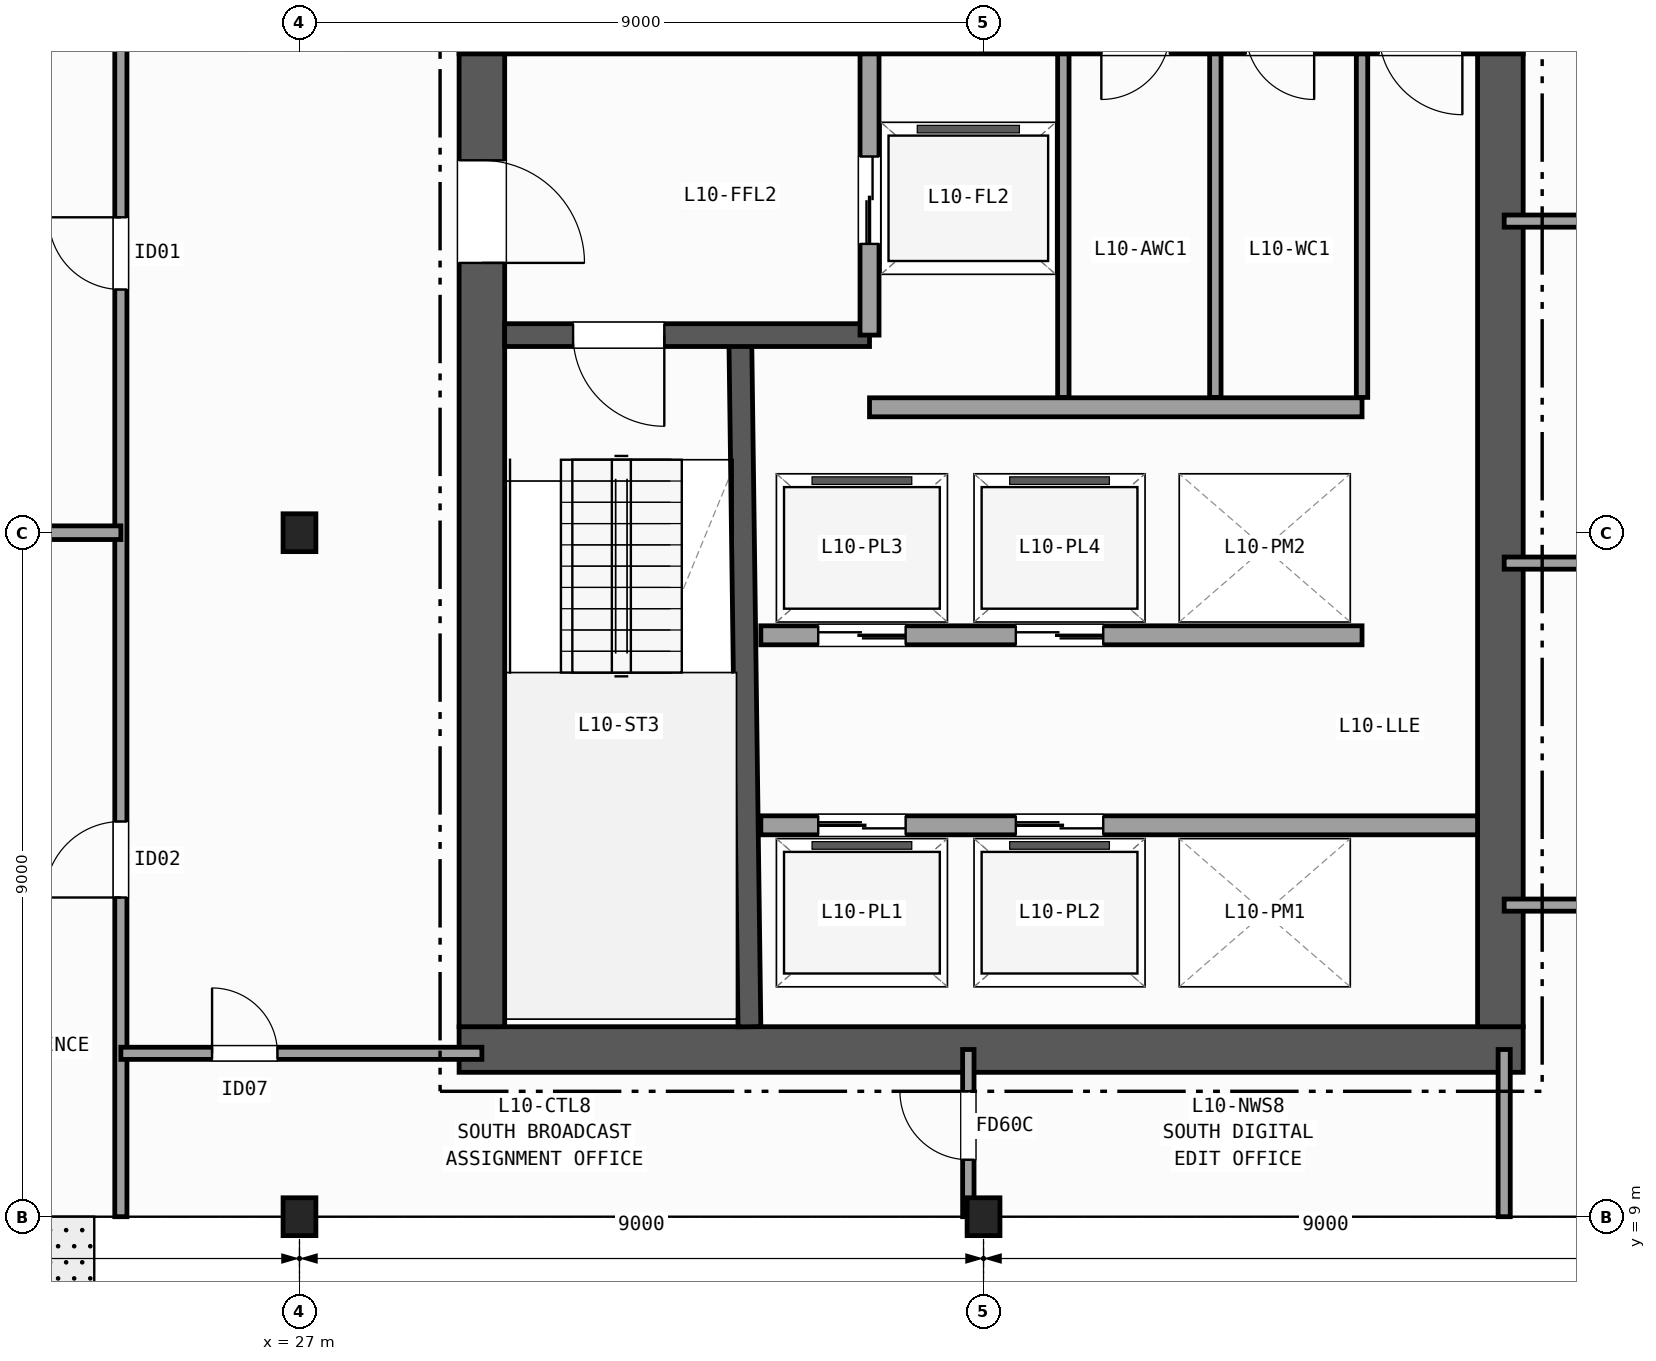
"""IFC4 building model, lengths in metres.
Left out: names, types, materials, properties, quantities, classifications, styles, units other than length and angle.
Written with IfcOpenShell. Run it as: python <this file> out.ifc"""

import sys

from ifc_helpers import new_model, si_unit, direction, frame, frame_2d, origin, origin_2d, place, context, subcontext, project, spatial, rectangle, i_section, extrude, element, fill, save


model = new_model("IFC4")
c1 = context("Model", 3, precision=1e-05, world=origin(), true_north=direction((0.0, 1.0)))
c2 = subcontext(c1, "Body", "Model", "MODEL_VIEW")
j1 = project(units=[si_unit("LENGTHUNIT", "METRE"), si_unit("PLANEANGLEUNIT", "RADIAN")], contexts=[c1])
p1 = place(None, origin())
s1 = spatial("IfcSite", under=j1, at=p1, CompositionType="ELEMENT")
p2 = place(p1, origin())
s2 = spatial("IfcBuilding", under=s1, at=p2, CompositionType="ELEMENT")
p3 = place(p2, frame((0.0, 0.0, 47.1)))
s3 = spatial("IfcBuildingStorey", under=s2, at=p3, CompositionType="ELEMENT", Elevation=47.1)
for number, where, z_axis, x_axis in (
    (1, (27.0, 9.0, 0.0), (0.0, 0.0, 1.0), (1.0, 0.0, 0.0)),
    (2, (27.0, 18.0, 0.0), (0.0, 0.0, 1.0), (1.0, 0.0, 0.0)),
    (3, (36.0, 9.0, 0.0), (0.0, 0.0, 1.0), (1.0, 0.0, 0.0)),
):
    element("IfcColumn", number, at=place(p3, frame(where, z_axis=z_axis, x_axis=x_axis)), inside=s3, PredefinedType="COLUMN", context=c2, shape_type="SweptSolid", body=[
        extrude(i_section(OverallWidth=0.432, OverallDepth=0.498, WebThickness=0.056, FlangeThickness=0.089, FilletRadius=0.015, at=origin_2d()), origin(), (0.0, 0.0, 1.0), 3.7),
    ])
p4 = place(p3, frame((29.1, 11.2, 0.0), z_axis=(0.0, 0.0, 1.0), x_axis=(1.0, 0.0, 0.0)))
e4 = element("IfcWall", 4, at=p4, inside=s3, PredefinedType="SHEAR", context=c2, shape_type="SweptSolid", body=[
    extrude(rectangle(XDim=14.0, YDim=0.6, at=frame_2d((7.0, 0.0))), origin(), (0.0, 0.0, 1.0), 3.42),
])
p5 = place(p3, frame((43.1, 24.6, 0.0), z_axis=(0.0, 0.0, 1.0), x_axis=(-1.0, 0.0, 0.0)))
e5 = element("IfcWall", 5, at=p5, inside=s3, PredefinedType="SHEAR", context=c2, shape_type="SweptSolid", body=[
    extrude(rectangle(XDim=14.0, YDim=0.6, at=frame_2d((7.0, 0.0))), origin(), (0.0, 0.0, 1.0), 3.42),
])
p6 = place(p5, frame((0.8, 0.0, 0.0)))
e6 = element("IfcOpeningElement", 6, at=p6, cuts=e5, PredefinedType="OPENING", context=c2, shape_type="SweptSolid", body=[
    extrude(rectangle(XDim=1.1, YDim=2.15, at=frame_2d((0.55, 1.075))), frame((0.0, 0.31, 0.0), z_axis=(0.0, -1.0, 0.0), x_axis=(1.0, 0.0, 0.0)), (0.0, 0.0, 1.0), 0.62),
])
p7 = place(p5, frame((2.75, 0.0, 0.0)))
e7 = element("IfcOpeningElement", 7, at=p7, cuts=e5, PredefinedType="OPENING", context=c2, shape_type="SweptSolid", body=[
    extrude(rectangle(XDim=0.9, YDim=2.1, at=frame_2d((0.45, 1.05))), frame((0.0, 0.31, 0.0), z_axis=(0.0, -1.0, 0.0), x_axis=(1.0, 0.0, 0.0)), (0.0, 0.0, 1.0), 0.62),
])
p8 = place(p5, frame((4.65, 0.0, 0.0)))
e8 = element("IfcOpeningElement", 8, at=p8, cuts=e5, PredefinedType="OPENING", context=c2, shape_type="SweptSolid", body=[
    extrude(rectangle(XDim=0.9, YDim=2.1, at=frame_2d((0.45, 1.05))), frame((0.0, 0.31, 0.0), z_axis=(0.0, -1.0, 0.0), x_axis=(1.0, 0.0, 0.0)), (0.0, 0.0, 1.0), 0.62),
])
p9 = place(p3, frame((29.4, 24.3, 0.0), z_axis=(0.0, 0.0, 1.0), x_axis=(0.0, -1.0, 0.0)))
e9 = element("IfcWall", 9, at=p9, inside=s3, PredefinedType="SHEAR", context=c2, shape_type="SweptSolid", body=[
    extrude(rectangle(XDim=12.8, YDim=0.6, at=frame_2d((6.4, 0.0))), origin(), (0.0, 0.0, 1.0), 3.42),
])
p10 = place(p9, frame((1.4, 0.0, 0.0)))
e10 = element("IfcOpeningElement", 10, at=p10, cuts=e9, PredefinedType="OPENING", context=c2, shape_type="SweptSolid", body=[
    extrude(rectangle(XDim=1.35, YDim=2.15, at=frame_2d((0.675, 1.075))), frame((0.0, 0.31, 0.0), z_axis=(0.0, -1.0, 0.0), x_axis=(1.0, 0.0, 0.0)), (0.0, 0.0, 1.0), 0.62),
])
p11 = place(p3, frame((42.8, 11.5, 0.0), z_axis=(0.0, 0.0, 1.0), x_axis=(0.0, 1.0, 0.0)))
e11 = element("IfcWall", 11, at=p11, inside=s3, PredefinedType="SHEAR", context=c2, shape_type="SweptSolid", body=[
    extrude(rectangle(XDim=12.8, YDim=0.6, at=frame_2d((6.4, 0.0))), origin(), (0.0, 0.0, 1.0), 3.42),
])
p12 = place(p3, frame((32.92, 11.5, 0.0), z_axis=(0.0, 0.0, 1.0), x_axis=(-0.013244407292, 0.999912288991, 0.0)))
e12 = element("IfcWall", 12, at=p12, inside=s3, PredefinedType="SHEAR", context=c2, shape_type="SweptSolid", body=[
    extrude(rectangle(XDim=9.051, YDim=0.3, at=frame_2d((4.525, 0.0))), origin(), (0.0, 0.0, 1.0), 3.42),
])
p13 = place(p3, frame((34.5, 20.6, 0.0), z_axis=(0.0, 0.0, 1.0), x_axis=(-1.0, 0.0, 0.0)))
e13 = element("IfcWall", 13, at=p13, inside=s3, PredefinedType="SHEAR", context=c2, shape_type="SweptSolid", body=[
    extrude(rectangle(XDim=4.8, YDim=0.3, at=frame_2d((2.4, 0.0))), origin(), (0.0, 0.0, 1.0), 3.42),
])
p14 = place(p13, frame((2.7, 0.0, 0.0)))
e14 = element("IfcOpeningElement", 14, at=p14, cuts=e13, PredefinedType="OPENING", context=c2, shape_type="SweptSolid", body=[
    extrude(rectangle(XDim=1.2, YDim=2.15, at=frame_2d((0.6, 1.075))), frame((0.0, 0.16, 0.0), z_axis=(0.0, -1.0, 0.0), x_axis=(1.0, 0.0, 0.0)), (0.0, 0.0, 1.0), 0.32),
])
p15 = place(p3, frame((34.5, 20.6, 0.0), z_axis=(0.0, 0.0, 1.0), x_axis=(0.0, 1.0, 0.0)))
e15 = element("IfcWall", 15, at=p15, inside=s3, PredefinedType="PARTITIONING", context=c2, shape_type="SweptSolid", body=[
    extrude(rectangle(XDim=3.7, YDim=0.25, at=frame_2d((1.85, 0.0))), origin(), (0.0, 0.0, 1.0), 3.42),
])
p16 = place(p15, frame((1.2, 0.0, 0.0)))
e16 = element("IfcOpeningElement", 16, at=p16, cuts=e15, PredefinedType="OPENING", context=c2, shape_type="SweptSolid", body=[
    extrude(rectangle(XDim=1.15, YDim=2.15, at=frame_2d((0.575, 1.075))), frame((0.0, 0.135, 0.0), z_axis=(0.0, -1.0, 0.0), x_axis=(1.0, 0.0, 0.0)), (0.0, 0.0, 1.0), 0.27),
])
p17 = place(p3, frame((34.5, 19.65, 0.0), z_axis=(0.0, 0.0, 1.0), x_axis=(1.0, 0.0, 0.0)))
e17 = element("IfcWall", 17, at=p17, inside=s3, PredefinedType="PARTITIONING", context=c2, shape_type="SweptSolid", body=[
    extrude(rectangle(XDim=6.48, YDim=0.25, at=frame_2d((3.24, 0.0))), origin(), (0.0, 0.0, 1.0), 3.42),
])
p18 = place(p3, frame((33.07, 14.15, 0.0), z_axis=(0.0, 0.0, 1.0), x_axis=(1.0, 0.0, 0.0)))
e18 = element("IfcWall", 18, at=p18, inside=s3, PredefinedType="PARTITIONING", context=c2, shape_type="SweptSolid", body=[
    extrude(rectangle(XDim=9.43, YDim=0.25, at=frame_2d((4.715, 0.0))), origin(), (0.0, 0.0, 1.0), 3.42),
])
p19 = place(p18, frame((0.755, 0.0, 0.0)))
e19 = element("IfcOpeningElement", 19, at=p19, cuts=e18, PredefinedType="OPENING", context=c2, shape_type="SweptSolid", body=[
    extrude(rectangle(XDim=1.15, YDim=2.15, at=frame_2d((0.575, 1.075))), frame((0.0, 0.135, 0.0), z_axis=(0.0, -1.0, 0.0), x_axis=(1.0, 0.0, 0.0)), (0.0, 0.0, 1.0), 0.27),
])
p20 = place(p18, frame((3.355, 0.0, 0.0)))
e20 = element("IfcOpeningElement", 20, at=p20, cuts=e18, PredefinedType="OPENING", context=c2, shape_type="SweptSolid", body=[
    extrude(rectangle(XDim=1.15, YDim=2.15, at=frame_2d((0.575, 1.075))), frame((0.0, 0.135, 0.0), z_axis=(0.0, -1.0, 0.0), x_axis=(1.0, 0.0, 0.0)), (0.0, 0.0, 1.0), 0.27),
])
p21 = place(p3, frame((40.98, 16.65, 0.0), z_axis=(0.0, 0.0, 1.0), x_axis=(-1.0, 0.0, 0.0)))
e21 = element("IfcWall", 21, at=p21, inside=s3, PredefinedType="PARTITIONING", context=c2, shape_type="SweptSolid", body=[
    extrude(rectangle(XDim=7.91, YDim=0.25, at=frame_2d((3.955, 0.0))), origin(), (0.0, 0.0, 1.0), 3.42),
])
p22 = place(p21, frame((6.005, 0.0, 0.0)))
e22 = element("IfcOpeningElement", 22, at=p22, cuts=e21, PredefinedType="OPENING", context=c2, shape_type="SweptSolid", body=[
    extrude(rectangle(XDim=1.15, YDim=2.15, at=frame_2d((0.575, 1.075))), frame((0.0, 0.135, 0.0), z_axis=(0.0, -1.0, 0.0), x_axis=(1.0, 0.0, 0.0)), (0.0, 0.0, 1.0), 0.27),
])
p23 = place(p21, frame((3.405, 0.0, 0.0)))
e23 = element("IfcOpeningElement", 23, at=p23, cuts=e21, PredefinedType="OPENING", context=c2, shape_type="SweptSolid", body=[
    extrude(rectangle(XDim=1.15, YDim=2.15, at=frame_2d((0.575, 1.075))), frame((0.0, 0.135, 0.0), z_axis=(0.0, -1.0, 0.0), x_axis=(1.0, 0.0, 0.0)), (0.0, 0.0, 1.0), 0.27),
])
for number, where, z_axis, x_axis in (
    (24, (37.05, 19.78, 0.0), (0.0, 0.0, 1.0), (0.0, 1.0, 0.0)),
    (25, (39.05, 19.78, 0.0), (0.0, 0.0, 1.0), (0.0, 1.0, 0.0)),
    (26, (40.98, 19.78, 0.0), (0.0, 0.0, 1.0), (0.0, 1.0, 0.0)),
):
    element("IfcWall", number, at=place(p3, frame(where, z_axis=z_axis, x_axis=x_axis)), inside=s3, PredefinedType="PARTITIONING", context=c2, shape_type="SweptSolid", body=[
        extrude(rectangle(XDim=4.52, YDim=0.15, at=frame_2d((2.26, 0.0))), origin(), (0.0, 0.0, 1.0), 3.42),
    ])
p24 = place(p3, frame((24.65, 9.0, 0.0), z_axis=(0.0, 0.0, 1.0), x_axis=(0.0, 1.0, 0.0)))
e27 = element("IfcWall", 27, at=p24, inside=s3, PredefinedType="PARTITIONING", context=c2, shape_type="SweptSolid", body=[
    extrude(rectangle(XDim=19.2, YDim=0.16, at=frame_2d((9.6, 0.0))), origin(), (0.0, 0.0, 1.0), 2.627),
])
p25 = place(p24, frame((12.2, 0.0, 0.0)))
e28 = element("IfcOpeningElement", 28, at=p25, cuts=e27, PredefinedType="OPENING", context=c2, shape_type="SweptSolid", body=[
    extrude(rectangle(XDim=0.95, YDim=2.1, at=frame_2d((0.475, 1.05))), frame((0.0, 0.09, 0.0), z_axis=(0.0, -1.0, 0.0), x_axis=(1.0, 0.0, 0.0)), (0.0, 0.0, 1.0), 0.18),
])
p26 = place(p24, frame((4.2, 0.0, 0.0)))
e29 = element("IfcOpeningElement", 29, at=p26, cuts=e27, PredefinedType="OPENING", context=c2, shape_type="SweptSolid", body=[
    extrude(rectangle(XDim=1.0, YDim=2.1, at=frame_2d((0.5, 1.05))), frame((0.0, 0.09, 0.0), z_axis=(0.0, -1.0, 0.0), x_axis=(1.0, 0.0, 0.0)), (0.0, 0.0, 1.0), 0.18),
])
p27 = place(p3, frame((9.0, 18.0, 0.0), z_axis=(0.0, 0.0, 1.0), x_axis=(1.0, 0.0, 0.0)))
e30 = element("IfcWall", 30, at=p27, inside=s3, PredefinedType="PARTITIONING", context=c2, shape_type="SweptSolid", body=[
    extrude(rectangle(XDim=15.65, YDim=0.18, at=frame_2d((7.825, 0.0))), origin(), (0.0, 0.0, 1.0), 2.627),
])
p28 = place(p3, frame((24.65, 11.15, 0.0), z_axis=(0.0, 0.0, 1.0), x_axis=(1.0, 0.0, 0.0)))
e31 = element("IfcWall", 31, at=p28, inside=s3, PredefinedType="PARTITIONING", context=c2, shape_type="SweptSolid", body=[
    extrude(rectangle(XDim=4.75, YDim=0.16, at=frame_2d((2.375, 0.0))), origin(), (0.0, 0.0, 1.0), 2.792),
])
p29 = place(p28, frame((1.2, 0.0, 0.0)))
e32 = element("IfcOpeningElement", 32, at=p29, cuts=e31, PredefinedType="OPENING", context=c2, shape_type="SweptSolid", body=[
    extrude(rectangle(XDim=0.86, YDim=2.05, at=frame_2d((0.43, 1.025))), frame((0.0, 0.09, 0.0), z_axis=(0.0, -1.0, 0.0), x_axis=(1.0, 0.0, 0.0)), (0.0, 0.0, 1.0), 0.18),
])
p30 = place(p3, frame((35.8, 9.0, 0.0), z_axis=(0.0, 0.0, 1.0), x_axis=(0.0, 1.0, 0.0)))
e33 = element("IfcWall", 33, at=p30, inside=s3, PredefinedType="PARTITIONING", context=c2, shape_type="SweptSolid", body=[
    extrude(rectangle(XDim=2.2, YDim=0.15, at=frame_2d((1.1, 0.0))), origin(), (0.0, 0.0, 1.0), 2.627),
])
p31 = place(p30, frame((0.75, 0.0, 0.0)))
e34 = element("IfcOpeningElement", 34, at=p31, cuts=e33, PredefinedType="OPENING", context=c2, shape_type="SweptSolid", body=[
    extrude(rectangle(XDim=0.9, YDim=2.1, at=frame_2d((0.45, 1.05))), frame((0.0, 0.085, 0.0), z_axis=(0.0, -1.0, 0.0), x_axis=(1.0, 0.0, 0.0)), (0.0, 0.0, 1.0), 0.17),
])
p32 = place(p3, frame((42.85, 9.0, 0.0), z_axis=(0.0, 0.0, 1.0), x_axis=(0.0, 1.0, 0.0)))
e35 = element("IfcWall", 35, at=p32, inside=s3, PredefinedType="PARTITIONING", context=c2, shape_type="SweptSolid", body=[
    extrude(rectangle(XDim=2.2, YDim=0.16, at=frame_2d((1.1, 0.0))), origin(), (0.0, 0.0, 1.0), 2.627),
])
p33 = place(p3, frame((42.85, 13.1, 0.0), z_axis=(0.0, 0.0, 1.0), x_axis=(1.0, 0.0, 0.0)))
e36 = element("IfcWall", 36, at=p33, inside=s3, PredefinedType="PARTITIONING", context=c2, shape_type="SweptSolid", body=[
    extrude(rectangle(XDim=20.346, YDim=0.16, at=frame_2d((10.173, 0.0))), origin(), (0.0, 0.0, 1.0), 3.42),
])
p34 = place(p33, frame((4.6, 0.0, 0.0)))
e37 = element("IfcOpeningElement", 37, at=p34, cuts=e36, PredefinedType="OPENING", context=c2, shape_type="SweptSolid", body=[
    extrude(rectangle(XDim=1.05, YDim=2.15, at=frame_2d((0.525, 1.075))), frame((0.0, 0.09, 0.0), z_axis=(0.0, -1.0, 0.0), x_axis=(1.0, 0.0, 0.0)), (0.0, 0.0, 1.0), 0.18),
])
p35 = place(p3, frame((42.85, 17.6, 0.0), z_axis=(0.0, 0.0, 1.0), x_axis=(1.0, 0.0, 0.0)))
e38 = element("IfcWall", 38, at=p35, inside=s3, PredefinedType="PARTITIONING", context=c2, shape_type="SweptSolid", body=[
    extrude(rectangle(XDim=20.809, YDim=0.16, at=frame_2d((10.404, 0.0))), origin(), (0.0, 0.0, 1.0), 3.42),
])
p36 = place(p35, frame((4.6, 0.0, 0.0)))
e39 = element("IfcOpeningElement", 39, at=p36, cuts=e38, PredefinedType="OPENING", context=c2, shape_type="SweptSolid", body=[
    extrude(rectangle(XDim=1.2, YDim=2.15, at=frame_2d((0.6, 1.075))), frame((0.0, 0.09, 0.0), z_axis=(0.0, -1.0, 0.0), x_axis=(1.0, 0.0, 0.0)), (0.0, 0.0, 1.0), 0.18),
])
p37 = place(p3, frame((42.85, 22.1, 0.0), z_axis=(0.0, 0.0, 1.0), x_axis=(1.0, 0.0, 0.0)))
e40 = element("IfcWall", 40, at=p37, inside=s3, PredefinedType="PARTITIONING", context=c2, shape_type="SweptSolid", body=[
    extrude(rectangle(XDim=20.428, YDim=0.16, at=frame_2d((10.214, 0.0))), origin(), (0.0, 0.0, 1.0), 3.42),
])
p38 = place(p37, frame((4.6, 0.0, 0.0)))
e41 = element("IfcOpeningElement", 41, at=p38, cuts=e40, PredefinedType="OPENING", context=c2, shape_type="SweptSolid", body=[
    extrude(rectangle(XDim=0.86, YDim=2.05, at=frame_2d((0.43, 1.025))), frame((0.0, 0.09, 0.0), z_axis=(0.0, -1.0, 0.0), x_axis=(1.0, 0.0, 0.0)), (0.0, 0.0, 1.0), 0.18),
])
p39 = place(p14, origin())
e42 = element("IfcDoor", 42, at=p39, inside=s3, OperationType="SINGLE_SWING_LEFT", PredefinedType="DOOR", context=c2, shape_type="SweptSolid", body=[
    extrude(rectangle(XDim=1.2, YDim=2.15, at=frame_2d((0.6, 1.075))), frame((0.0, 0.025, 0.0), z_axis=(0.0, -1.0, 0.0), x_axis=(1.0, 0.0, 0.0)), (0.0, 0.0, 1.0), 0.05),
])
fill(e14, e42)
p40 = place(p10, origin())
e43 = element("IfcDoor", 43, at=p40, inside=s3, OperationType="SINGLE_SWING_RIGHT", PredefinedType="DOOR", context=c2, shape_type="SweptSolid", body=[
    extrude(rectangle(XDim=1.35, YDim=2.15, at=frame_2d((0.675, 1.075))), frame((0.0, 0.025, 0.0), z_axis=(0.0, -1.0, 0.0), x_axis=(1.0, 0.0, 0.0)), (0.0, 0.0, 1.0), 0.05),
])
fill(e10, e43)
p41 = place(p16, origin())
e44 = element("IfcDoor", 44, at=p41, inside=s3, OperationType="DOUBLE_DOOR_SLIDING", PredefinedType="DOOR", context=c2, shape_type="SweptSolid", body=[
    extrude(rectangle(XDim=1.15, YDim=2.15, at=frame_2d((0.575, 1.075))), frame((0.0, 0.025, 0.0), z_axis=(0.0, -1.0, 0.0), x_axis=(1.0, 0.0, 0.0)), (0.0, 0.0, 1.0), 0.05),
])
fill(e16, e44)
p42 = place(p19, origin())
e45 = element("IfcDoor", 45, at=p42, inside=s3, OperationType="DOUBLE_DOOR_SLIDING", PredefinedType="DOOR", context=c2, shape_type="SweptSolid", body=[
    extrude(rectangle(XDim=1.15, YDim=2.15, at=frame_2d((0.575, 1.075))), frame((0.0, 0.025, 0.0), z_axis=(0.0, -1.0, 0.0), x_axis=(1.0, 0.0, 0.0)), (0.0, 0.0, 1.0), 0.05),
])
fill(e19, e45)
p43 = place(p20, origin())
e46 = element("IfcDoor", 46, at=p43, inside=s3, OperationType="DOUBLE_DOOR_SLIDING", PredefinedType="DOOR", context=c2, shape_type="SweptSolid", body=[
    extrude(rectangle(XDim=1.15, YDim=2.15, at=frame_2d((0.575, 1.075))), frame((0.0, 0.025, 0.0), z_axis=(0.0, -1.0, 0.0), x_axis=(1.0, 0.0, 0.0)), (0.0, 0.0, 1.0), 0.05),
])
fill(e20, e46)
p44 = place(p22, origin())
e47 = element("IfcDoor", 47, at=p44, inside=s3, OperationType="DOUBLE_DOOR_SLIDING", PredefinedType="DOOR", context=c2, shape_type="SweptSolid", body=[
    extrude(rectangle(XDim=1.15, YDim=2.15, at=frame_2d((0.575, 1.075))), frame((0.0, 0.025, 0.0), z_axis=(0.0, -1.0, 0.0), x_axis=(1.0, 0.0, 0.0)), (0.0, 0.0, 1.0), 0.05),
])
fill(e22, e47)
p45 = place(p23, origin())
e48 = element("IfcDoor", 48, at=p45, inside=s3, OperationType="DOUBLE_DOOR_SLIDING", PredefinedType="DOOR", context=c2, shape_type="SweptSolid", body=[
    extrude(rectangle(XDim=1.15, YDim=2.15, at=frame_2d((0.575, 1.075))), frame((0.0, 0.025, 0.0), z_axis=(0.0, -1.0, 0.0), x_axis=(1.0, 0.0, 0.0)), (0.0, 0.0, 1.0), 0.05),
])
fill(e23, e48)
p46 = place(p25, origin())
e49 = element("IfcDoor", 49, at=p46, inside=s3, OperationType="SINGLE_SWING_RIGHT", PredefinedType="DOOR", context=c2, shape_type="SweptSolid", body=[
    extrude(rectangle(XDim=0.95, YDim=2.1, at=frame_2d((0.475, 1.05))), frame((0.0, 0.025, 0.0), z_axis=(0.0, -1.0, 0.0), x_axis=(1.0, 0.0, 0.0)), (0.0, 0.0, 1.0), 0.05),
])
fill(e28, e49)
p47 = place(p26, origin())
e50 = element("IfcDoor", 50, at=p47, inside=s3, OperationType="SINGLE_SWING_LEFT", PredefinedType="DOOR", context=c2, shape_type="SweptSolid", body=[
    extrude(rectangle(XDim=1.0, YDim=2.1, at=frame_2d((0.5, 1.05))), frame((0.0, 0.025, 0.0), z_axis=(0.0, -1.0, 0.0), x_axis=(1.0, 0.0, 0.0)), (0.0, 0.0, 1.0), 0.05),
])
fill(e29, e50)
p48 = place(p29, origin())
e51 = element("IfcDoor", 51, at=p48, inside=s3, OperationType="SINGLE_SWING_LEFT", PredefinedType="DOOR", context=c2, shape_type="SweptSolid", body=[
    extrude(rectangle(XDim=0.86, YDim=2.05, at=frame_2d((0.43, 1.025))), frame((0.0, 0.025, 0.0), z_axis=(0.0, -1.0, 0.0), x_axis=(1.0, 0.0, 0.0)), (0.0, 0.0, 1.0), 0.05),
])
fill(e32, e51)
p49 = place(p31, origin())
e52 = element("IfcDoor", 52, at=p49, inside=s3, OperationType="SINGLE_SWING_RIGHT", PredefinedType="DOOR", context=c2, shape_type="SweptSolid", body=[
    extrude(rectangle(XDim=0.9, YDim=2.1, at=frame_2d((0.45, 1.05))), frame((0.0, 0.025, 0.0), z_axis=(0.0, -1.0, 0.0), x_axis=(1.0, 0.0, 0.0)), (0.0, 0.0, 1.0), 0.05),
])
fill(e34, e52)
save(model, sys.argv[1])
